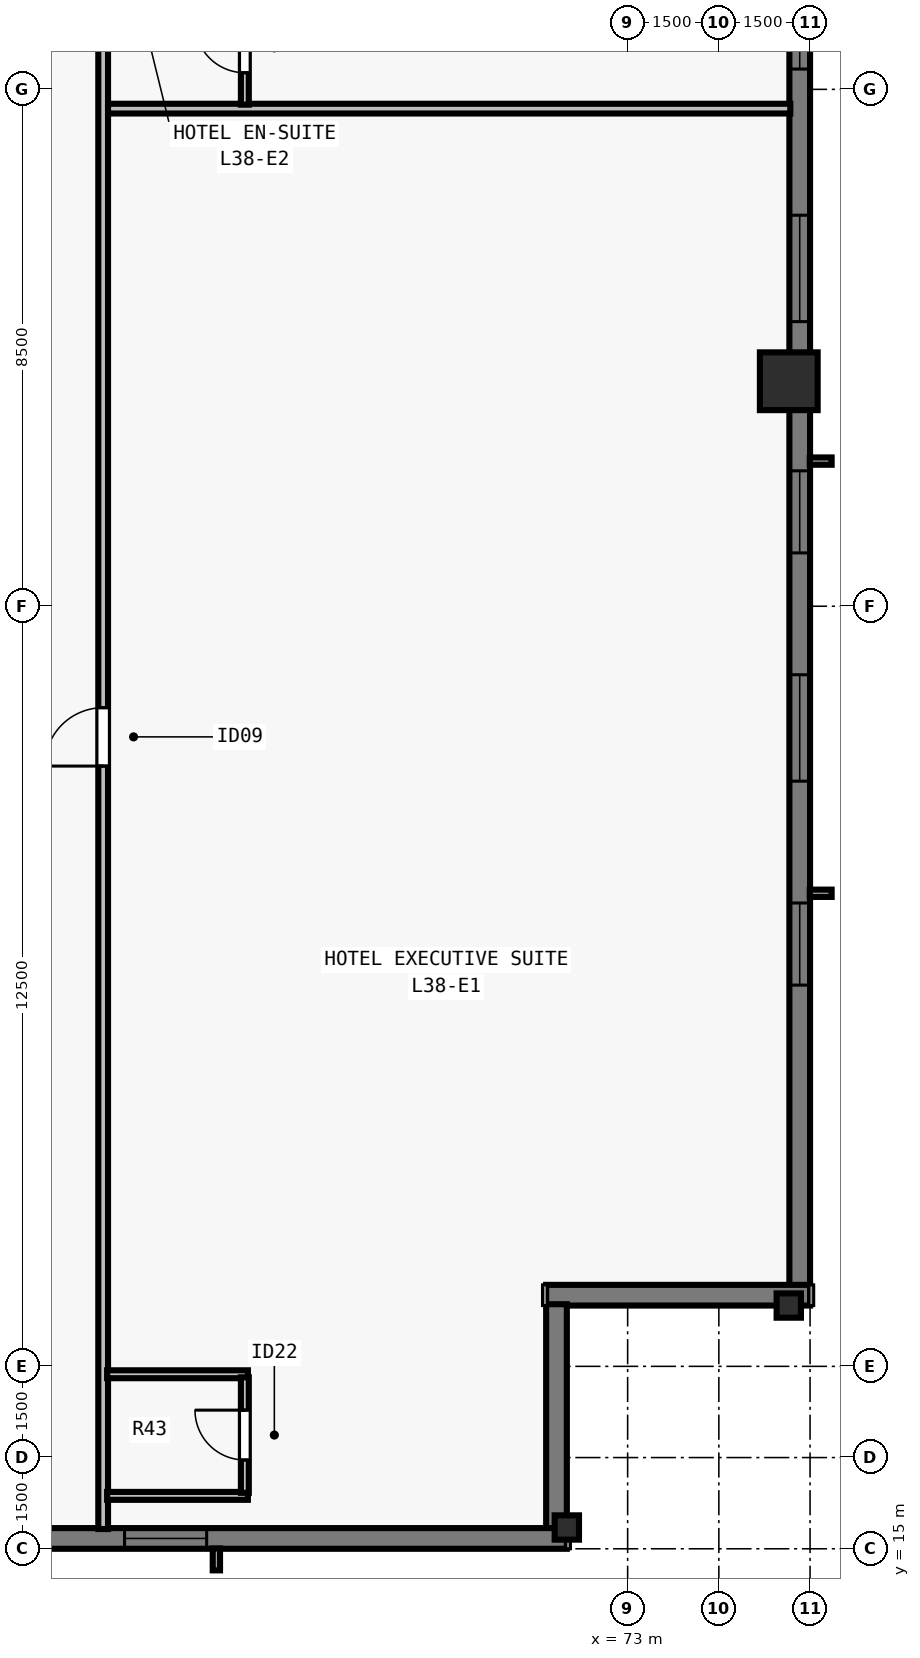
"""IFC4 building model, lengths in metres.
Left out: names, types, materials, properties, quantities, classifications, styles, units other than length and angle.
Written with IfcOpenShell. Run it as: python <this file> out.ifc"""

import sys

from ifc_helpers import new_model, si_unit, direction, frame, frame_2d, origin, origin_2d, place, context, subcontext, project, spatial, rectangle, i_section, extrude, element, fill, save


model = new_model("IFC4")
c1 = context("Model", 3, precision=1e-05, world=origin(), true_north=direction((0.0, 1.0)))
c2 = subcontext(c1, "Body", "Model", "MODEL_VIEW")
j1 = project(units=[si_unit("LENGTHUNIT", "METRE"), si_unit("PLANEANGLEUNIT", "RADIAN")], contexts=[c1])
p1 = place(None, origin())
s1 = spatial("IfcSite", under=j1, at=p1, CompositionType="ELEMENT")
p2 = place(p1, origin())
s2 = spatial("IfcBuilding", under=s1, at=p2, CompositionType="ELEMENT")
p3 = place(p2, frame((0.0, 0.0, 141.0)))
s3 = spatial("IfcBuildingStorey", under=s2, at=p3, CompositionType="ELEMENT", Elevation=141.0)
for number, where, z_axis, x_axis in (
    (1, (72.0, 15.35, 0.0), (0.0, 0.0, 1.0), (1.0, 0.0, 0.0)),
    (2, (75.65, 19.0, 0.0), (0.0, 0.0, 1.0), (0.0, 1.0, 0.0)),
):
    element("IfcColumn", number, at=place(p3, frame(where, z_axis=z_axis, x_axis=x_axis)), inside=s3, PredefinedType="COLUMN", context=c2, shape_type="SweptSolid", body=[
        extrude(i_section(OverallWidth=0.4, OverallDepth=0.4, WebThickness=0.022, FlangeThickness=0.036, at=origin_2d()), origin(), (0.0, 0.0, 1.0), 3.5),
    ])
p4 = place(p3, frame((75.65, 34.2, 0.0), z_axis=(0.0, 0.0, 1.0), x_axis=(0.0, 1.0, 0.0)))
e3 = element("IfcColumn", 3, at=p4, inside=s3, PredefinedType="COLUMN", context=c2, shape_type="SweptSolid", body=[
    extrude(rectangle(XDim=0.95, YDim=0.95, at=origin_2d()), origin(), (0.0, 0.0, 1.0), 3.5),
])
p5 = place(p3, frame((75.83, 59.0, 0.0), z_axis=(0.0, 0.0, 1.0), x_axis=(0.0, -1.0, 0.0)))
e4 = element("IfcWall", 4, at=p5, inside=s3, PredefinedType="SOLIDWALL", context=c2, shape_type="SweptSolid", body=[
    extrude(rectangle(XDim=39.682, YDim=0.34, at=frame_2d((19.841, 0.0))), origin(), (0.0, 0.0, 1.0), 3.28),
])
p6 = place(p5, frame((4.952, 0.0, 0.8)))
e5 = element("IfcOpeningElement", 5, at=p6, cuts=e4, PredefinedType="OPENING", context=c2, shape_type="SweptSolid", body=[
    extrude(rectangle(XDim=1.35, YDim=1.66, at=frame_2d((0.675, 0.83))), frame((0.0, 0.18, 0.0), z_axis=(0.0, -1.0, 0.0), x_axis=(1.0, 0.0, 0.0)), (0.0, 0.0, 1.0), 0.36),
])
p7 = place(p5, frame((8.305, 0.0, 0.8)))
e6 = element("IfcOpeningElement", 6, at=p7, cuts=e4, PredefinedType="OPENING", context=c2, shape_type="SweptSolid", body=[
    extrude(rectangle(XDim=1.75, YDim=1.66, at=frame_2d((0.875, 0.83))), frame((0.0, 0.18, 0.0), z_axis=(0.0, -1.0, 0.0), x_axis=(1.0, 0.0, 0.0)), (0.0, 0.0, 1.0), 0.36),
])
p8 = place(p5, frame((12.059, 0.0, 0.8)))
e7 = element("IfcOpeningElement", 7, at=p8, cuts=e4, PredefinedType="OPENING", context=c2, shape_type="SweptSolid", body=[
    extrude(rectangle(XDim=1.35, YDim=1.66, at=frame_2d((0.675, 0.83))), frame((0.0, 0.18, 0.0), z_axis=(0.0, -1.0, 0.0), x_axis=(1.0, 0.0, 0.0)), (0.0, 0.0, 1.0), 0.36),
])
p9 = place(p5, frame((16.262, 0.0, 0.8)))
e8 = element("IfcOpeningElement", 8, at=p9, cuts=e4, PredefinedType="OPENING", context=c2, shape_type="SweptSolid", body=[
    extrude(rectangle(XDim=1.75, YDim=1.66, at=frame_2d((0.875, 0.83))), frame((0.0, 0.18, 0.0), z_axis=(0.0, -1.0, 0.0), x_axis=(1.0, 0.0, 0.0)), (0.0, 0.0, 1.0), 0.36),
])
p10 = place(p5, frame((18.316, 0.0, 0.8)))
e9 = element("IfcOpeningElement", 9, at=p10, cuts=e4, PredefinedType="OPENING", context=c2, shape_type="SweptSolid", body=[
    extrude(rectangle(XDim=1.35, YDim=1.66, at=frame_2d((0.675, 0.83))), frame((0.0, 0.18, 0.0), z_axis=(0.0, -1.0, 0.0), x_axis=(1.0, 0.0, 0.0)), (0.0, 0.0, 1.0), 0.36),
])
p11 = place(p5, frame((22.07, 0.0, 0.8)))
e10 = element("IfcOpeningElement", 10, at=p11, cuts=e4, PredefinedType="OPENING", context=c2, shape_type="SweptSolid", body=[
    extrude(rectangle(XDim=1.75, YDim=1.66, at=frame_2d((0.875, 0.83))), frame((0.0, 0.18, 0.0), z_axis=(0.0, -1.0, 0.0), x_axis=(1.0, 0.0, 0.0)), (0.0, 0.0, 1.0), 0.36),
])
p12 = place(p5, frame((26.273, 0.0, 0.8)))
e11 = element("IfcOpeningElement", 11, at=p12, cuts=e4, PredefinedType="OPENING", context=c2, shape_type="SweptSolid", body=[
    extrude(rectangle(XDim=1.35, YDim=1.66, at=frame_2d((0.675, 0.83))), frame((0.0, 0.18, 0.0), z_axis=(0.0, -1.0, 0.0), x_axis=(1.0, 0.0, 0.0)), (0.0, 0.0, 1.0), 0.36),
])
p13 = place(p5, frame((29.627, 0.0, 0.8)))
e12 = element("IfcOpeningElement", 12, at=p13, cuts=e4, PredefinedType="OPENING", context=c2, shape_type="SweptSolid", body=[
    extrude(rectangle(XDim=1.75, YDim=1.66, at=frame_2d((0.875, 0.83))), frame((0.0, 0.18, 0.0), z_axis=(0.0, -1.0, 0.0), x_axis=(1.0, 0.0, 0.0)), (0.0, 0.0, 1.0), 0.36),
])
p14 = place(p5, frame((33.38, 0.0, 0.8)))
e13 = element("IfcOpeningElement", 13, at=p14, cuts=e4, PredefinedType="OPENING", context=c2, shape_type="SweptSolid", body=[
    extrude(rectangle(XDim=1.35, YDim=1.66, at=frame_2d((0.675, 0.83))), frame((0.0, 0.18, 0.0), z_axis=(0.0, -1.0, 0.0), x_axis=(1.0, 0.0, 0.0)), (0.0, 0.0, 1.0), 0.36),
])
p15 = place(p3, frame((76.0, 19.17, 0.0), z_axis=(0.0, 0.0, 1.0), x_axis=(-1.0, 0.0, 0.0)))
e14 = element("IfcWall", 14, at=p15, inside=s3, PredefinedType="SOLIDWALL", context=c2, shape_type="SweptSolid", body=[
    extrude(rectangle(XDim=4.34, YDim=0.34, at=frame_2d((2.17, 0.0))), origin(), (0.0, 0.0, 1.0), 3.28),
])
p16 = place(p3, frame((71.83, 19.022, 0.0), z_axis=(0.0, 0.0, 1.0), x_axis=(0.0, -1.0, 0.0)))
e15 = element("IfcWall", 15, at=p16, inside=s3, PredefinedType="SOLIDWALL", context=c2, shape_type="SweptSolid", body=[
    extrude(rectangle(XDim=3.704, YDim=0.34, at=frame_2d((1.852, 0.0))), origin(), (0.0, 0.0, 1.0), 3.28),
])
p17 = place(p3, frame((72.0, 15.17, 0.0), z_axis=(0.0, 0.0, 1.0), x_axis=(-1.0, 0.0, 0.0)))
e16 = element("IfcWall", 16, at=p17, inside=s3, PredefinedType="SOLIDWALL", context=c2, shape_type="SweptSolid", body=[
    extrude(rectangle(XDim=26.682, YDim=0.34, at=frame_2d((13.341, 0.0))), origin(), (0.0, 0.0, 1.0), 3.28),
])
p18 = place(p17, frame((5.923, 0.0, 0.8)))
e17 = element("IfcOpeningElement", 17, at=p18, cuts=e16, PredefinedType="OPENING", context=c2, shape_type="SweptSolid", body=[
    extrude(rectangle(XDim=1.35, YDim=1.66, at=frame_2d((0.675, 0.83))), frame((0.0, 0.18, 0.0), z_axis=(0.0, -1.0, 0.0), x_axis=(1.0, 0.0, 0.0)), (0.0, 0.0, 1.0), 0.36),
])
p19 = place(p17, frame((12.666, 0.0, 0.8)))
e18 = element("IfcOpeningElement", 18, at=p19, cuts=e16, PredefinedType="OPENING", context=c2, shape_type="SweptSolid", body=[
    extrude(rectangle(XDim=1.35, YDim=1.66, at=frame_2d((0.675, 0.83))), frame((0.0, 0.18, 0.0), z_axis=(0.0, -1.0, 0.0), x_axis=(1.0, 0.0, 0.0)), (0.0, 0.0, 1.0), 0.36),
])
p20 = place(p17, frame((16.262, 0.0, 0.8)))
e19 = element("IfcOpeningElement", 19, at=p20, cuts=e16, PredefinedType="OPENING", context=c2, shape_type="SweptSolid", body=[
    extrude(rectangle(XDim=1.75, YDim=1.66, at=frame_2d((0.875, 0.83))), frame((0.0, 0.18, 0.0), z_axis=(0.0, -1.0, 0.0), x_axis=(1.0, 0.0, 0.0)), (0.0, 0.0, 1.0), 0.36),
])
p21 = place(p17, frame((19.409, 0.0, 0.8)))
e20 = element("IfcOpeningElement", 20, at=p21, cuts=e16, PredefinedType="OPENING", context=c2, shape_type="SweptSolid", body=[
    extrude(rectangle(XDim=1.35, YDim=1.66, at=frame_2d((0.675, 0.83))), frame((0.0, 0.18, 0.0), z_axis=(0.0, -1.0, 0.0), x_axis=(1.0, 0.0, 0.0)), (0.0, 0.0, 1.0), 0.36),
])
p22 = place(p17, frame((21.59, 0.0, 0.8)))
e21 = element("IfcOpeningElement", 21, at=p22, cuts=e16, PredefinedType="OPENING", context=c2, shape_type="SweptSolid", body=[
    extrude(rectangle(XDim=0.9, YDim=1.66, at=frame_2d((0.45, 0.83))), frame((0.0, 0.18, 0.0), z_axis=(0.0, -1.0, 0.0), x_axis=(1.0, 0.0, 0.0)), (0.0, 0.0, 1.0), 0.36),
])
p23 = place(p3, frame((64.375, 15.325, 0.0), z_axis=(0.0, 0.0, 1.0), x_axis=(0.0, 1.0, 0.0)))
e22 = element("IfcWall", 22, at=p23, inside=s3, PredefinedType="PARTITIONING", context=c2, shape_type="SweptSolid", body=[
    extrude(rectangle(XDim=47.35, YDim=0.16, at=frame_2d((23.675, 0.0))), origin(), (0.0, 0.0, 1.0), 2.555),
])
p24 = place(p23, frame((12.547, 0.0, 0.0)))
e23 = element("IfcOpeningElement", 23, at=p24, cuts=e22, PredefinedType="OPENING", context=c2, shape_type="SweptSolid", body=[
    extrude(rectangle(XDim=0.96, YDim=2.15, at=frame_2d((0.48, 1.075))), frame((0.0, 0.09, 0.0), z_axis=(0.0, -1.0, 0.0), x_axis=(1.0, 0.0, 0.0)), (0.0, 0.0, 1.0), 0.18),
])
p25 = place(p23, frame((35.902, 0.0, 0.0)))
e24 = element("IfcOpeningElement", 24, at=p25, cuts=e22, PredefinedType="OPENING", context=c2, shape_type="SweptSolid", body=[
    extrude(rectangle(XDim=0.96, YDim=2.15, at=frame_2d((0.48, 1.075))), frame((0.0, 0.09, 0.0), z_axis=(0.0, -1.0, 0.0), x_axis=(1.0, 0.0, 0.0)), (0.0, 0.0, 1.0), 0.18),
])
for number, where, z_axis, x_axis in (
    (25, (64.44, 15.87, 0.0), (0.0, 0.0, 1.0), (1.0, 0.0, 0.0)),
    (26, (64.44, 17.87, 0.0), (0.0, 0.0, 1.0), (1.0, 0.0, 0.0)),
):
    element("IfcWall", number, at=place(p3, frame(where, z_axis=z_axis, x_axis=x_axis)), inside=s3, PredefinedType="PLUMBINGWALL", context=c2, shape_type="SweptSolid", body=[
        extrude(rectangle(XDim=2.315, YDim=0.13, at=frame_2d((1.157, 0.0))), origin(), (0.0, 0.0, 1.0), 3.28),
    ])
p26 = place(p3, frame((66.705, 15.92, 0.0), z_axis=(0.0, 0.0, 1.0), x_axis=(0.0, 1.0, 0.0)))
e27 = element("IfcWall", 27, at=p26, inside=s3, PredefinedType="PLUMBINGWALL", context=c2, shape_type="SweptSolid", body=[
    extrude(rectangle(XDim=1.9, YDim=0.13, at=frame_2d((0.95, 0.0))), origin(), (0.0, 0.0, 1.0), 3.28),
])
p27 = place(p26, frame((0.54, 0.0, 0.0)))
e28 = element("IfcOpeningElement", 28, at=p27, cuts=e27, PredefinedType="OPENING", context=c2, shape_type="SweptSolid", body=[
    extrude(rectangle(XDim=0.82, YDim=2.1, at=frame_2d((0.41, 1.05))), frame((0.0, 0.075, 0.0), z_axis=(0.0, -1.0, 0.0), x_axis=(1.0, 0.0, 0.0)), (0.0, 0.0, 1.0), 0.15),
])
p28 = place(p3, frame((64.455, 38.683, 0.0), z_axis=(0.0, 0.0, 1.0), x_axis=(1.0, 0.0, 0.0)))
e29 = element("IfcWall", 29, at=p28, inside=s3, PredefinedType="PARTITIONING", context=c2, shape_type="SweptSolid", body=[
    extrude(rectangle(XDim=11.22, YDim=0.16, at=frame_2d((5.61, 0.0))), origin(), (0.0, 0.0, 1.0), 3.28),
])
p29 = place(p3, frame((66.705, 38.748, 0.0), z_axis=(0.0, 0.0, 1.0), x_axis=(0.0, 1.0, 0.0)))
e30 = element("IfcWall", 30, at=p29, inside=s3, PredefinedType="PLUMBINGWALL", context=c2, shape_type="SweptSolid", body=[
    extrude(rectangle(XDim=1.885, YDim=0.13, at=frame_2d((0.942, 0.0))), origin(), (0.0, 0.0, 1.0), 3.28),
])
p30 = place(p29, frame((0.525, 0.0, 0.0)))
e31 = element("IfcOpeningElement", 31, at=p30, cuts=e30, PredefinedType="OPENING", context=c2, shape_type="SweptSolid", body=[
    extrude(rectangle(XDim=0.82, YDim=2.1, at=frame_2d((0.41, 1.05))), frame((0.0, 0.075, 0.0), z_axis=(0.0, -1.0, 0.0), x_axis=(1.0, 0.0, 0.0)), (0.0, 0.0, 1.0), 0.15),
])
p31 = place(p10, origin())
e32 = element("IfcWindow", 32, at=p31, inside=s3, PartitioningType="SINGLE_PANEL", PredefinedType="WINDOW", context=c2, shape_type="SweptSolid", body=[
    extrude(rectangle(XDim=1.35, YDim=1.66, at=frame_2d((0.675, 0.83))), frame((0.0, -0.05, 0.0), z_axis=(0.0, -1.0, 0.0), x_axis=(1.0, 0.0, 0.0)), (0.0, 0.0, 1.0), 0.06),
])
fill(e9, e32)
p32 = place(p11, origin())
e33 = element("IfcWindow", 33, at=p32, inside=s3, PartitioningType="SINGLE_PANEL", PredefinedType="WINDOW", context=c2, shape_type="SweptSolid", body=[
    extrude(rectangle(XDim=1.75, YDim=1.66, at=frame_2d((0.875, 0.83))), frame((0.0, -0.05, 0.0), z_axis=(0.0, -1.0, 0.0), x_axis=(1.0, 0.0, 0.0)), (0.0, 0.0, 1.0), 0.06),
])
fill(e10, e33)
p33 = place(p12, origin())
e34 = element("IfcWindow", 34, at=p33, inside=s3, PartitioningType="SINGLE_PANEL", PredefinedType="WINDOW", context=c2, shape_type="SweptSolid", body=[
    extrude(rectangle(XDim=1.35, YDim=1.66, at=frame_2d((0.675, 0.83))), frame((0.0, -0.05, 0.0), z_axis=(0.0, -1.0, 0.0), x_axis=(1.0, 0.0, 0.0)), (0.0, 0.0, 1.0), 0.06),
])
fill(e11, e34)
p34 = place(p13, origin())
e35 = element("IfcWindow", 35, at=p34, inside=s3, PartitioningType="SINGLE_PANEL", PredefinedType="WINDOW", context=c2, shape_type="SweptSolid", body=[
    extrude(rectangle(XDim=1.75, YDim=1.66, at=frame_2d((0.875, 0.83))), frame((0.0, -0.05, 0.0), z_axis=(0.0, -1.0, 0.0), x_axis=(1.0, 0.0, 0.0)), (0.0, 0.0, 1.0), 0.06),
])
fill(e12, e35)
p35 = place(p14, origin())
e36 = element("IfcWindow", 36, at=p35, inside=s3, PartitioningType="SINGLE_PANEL", PredefinedType="WINDOW", context=c2, shape_type="SweptSolid", body=[
    extrude(rectangle(XDim=1.35, YDim=1.66, at=frame_2d((0.675, 0.83))), frame((0.0, -0.05, 0.0), z_axis=(0.0, -1.0, 0.0), x_axis=(1.0, 0.0, 0.0)), (0.0, 0.0, 1.0), 0.06),
])
fill(e13, e36)
p36 = place(p18, origin())
e37 = element("IfcWindow", 37, at=p36, inside=s3, PartitioningType="SINGLE_PANEL", PredefinedType="WINDOW", context=c2, shape_type="SweptSolid", body=[
    extrude(rectangle(XDim=1.35, YDim=1.66, at=frame_2d((0.675, 0.83))), frame((0.0, -0.05, 0.0), z_axis=(0.0, -1.0, 0.0), x_axis=(1.0, 0.0, 0.0)), (0.0, 0.0, 1.0), 0.06),
])
fill(e17, e37)
p37 = place(p27, origin())
e38 = element("IfcDoor", 38, at=p37, inside=s3, OperationType="SINGLE_SWING_RIGHT", PredefinedType="DOOR", context=c2, shape_type="SweptSolid", body=[
    extrude(rectangle(XDim=0.82, YDim=2.1, at=frame_2d((0.41, 1.05))), frame((0.0, 0.025, 0.0), z_axis=(0.0, -1.0, 0.0), x_axis=(1.0, 0.0, 0.0)), (0.0, 0.0, 1.0), 0.05),
])
fill(e28, e38)
p38 = place(p24, origin())
e39 = element("IfcDoor", 39, at=p38, inside=s3, OperationType="SINGLE_SWING_LEFT", PredefinedType="DOOR", context=c2, shape_type="SweptSolid", body=[
    extrude(rectangle(XDim=0.96, YDim=2.15, at=frame_2d((0.48, 1.075))), frame((0.0, 0.025, 0.0), z_axis=(0.0, -1.0, 0.0), x_axis=(1.0, 0.0, 0.0)), (0.0, 0.0, 1.0), 0.05),
])
fill(e23, e39)
p39 = place(p30, origin())
e40 = element("IfcDoor", 40, at=p39, inside=s3, OperationType="SINGLE_SWING_RIGHT", PredefinedType="DOOR", context=c2, shape_type="SweptSolid", body=[
    extrude(rectangle(XDim=0.82, YDim=2.1, at=frame_2d((0.41, 1.05))), frame((0.0, 0.025, 0.0), z_axis=(0.0, -1.0, 0.0), x_axis=(1.0, 0.0, 0.0)), (0.0, 0.0, 1.0), 0.05),
])
fill(e31, e40)
save(model, sys.argv[1])
